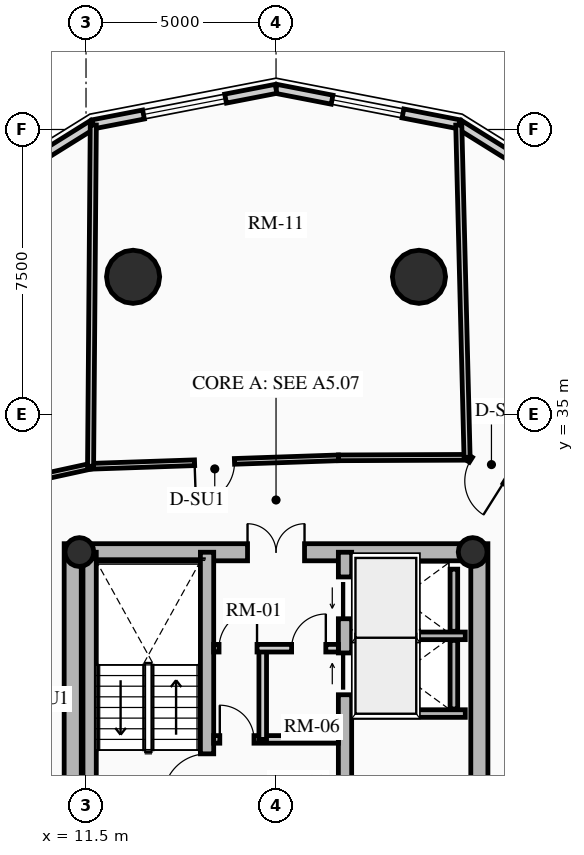
"""IFC4 building model, lengths in metres.
Left out: names, types, materials, properties, quantities, classifications, styles, units other than length and angle.
Written with IfcOpenShell. Run it as: python <this file> out.ifc"""

import sys

from ifc_helpers import new_model, si_unit, direction, frame, frame_2d, origin, origin_2d, place, context, subcontext, project, spatial, rectangle, circle, hollow_circle, extrude, source, transform, mapped, element, fill, save


model = new_model("IFC4")
c1 = context("Model", 3, precision=1e-05, world=origin(), true_north=direction((0.0, 1.0)))
c2 = subcontext(c1, "Body", "Model", "MODEL_VIEW")
j1 = project(units=[si_unit("LENGTHUNIT", "METRE"), si_unit("PLANEANGLEUNIT", "RADIAN")], contexts=[c1])
p1 = place(None, origin())
s1 = spatial("IfcSite", under=j1, at=p1, CompositionType="ELEMENT")
p2 = place(p1, origin())
s2 = spatial("IfcBuilding", under=s1, at=p2, CompositionType="ELEMENT")
p3 = place(p2, frame((0.0, 0.0, 81.79)))
s3 = spatial("IfcBuildingStorey", under=s2, at=p3, CompositionType="ELEMENT", Elevation=81.79)
for number, where, z_axis, x_axis in (
    (1, (11.15, 17.4, 0.0), (0.0, 0.0, 1.0), (0.0, 1.0, 0.0)),
    (2, (21.85, 17.4, 0.0), (0.0, 0.0, 1.0), (0.0, 1.0, 0.0)),
):
    element("IfcWall", number, at=place(p3, frame(where, z_axis=z_axis, x_axis=x_axis)), inside=s3, PredefinedType="SHEAR", context=c2, shape_type="SweptSolid", body=[
        extrude(rectangle(XDim=14.2, YDim=0.45, at=frame_2d((7.1, 0.0))), origin(), (0.0, 0.0, 1.0), 2.91),
    ])
p4 = place(p3, frame((11.15, 31.375, 0.0), z_axis=(0.0, 0.0, 1.0), x_axis=(1.0, 0.0, 0.0)))
e3 = element("IfcWall", 3, at=p4, inside=s3, PredefinedType="SHEAR", context=c2, shape_type="SweptSolid", body=[
    extrude(rectangle(XDim=10.7, YDim=0.45, at=frame_2d((5.35, 0.0))), origin(), (0.0, 0.0, 1.0), 2.91),
])
m1 = source(origin(), c2, "Body", "SweptSolid", [
    extrude(rectangle(XDim=1.5, YDim=2.02, at=frame_2d((0.75, 1.01))), frame((0.0, 0.235, 0.0), z_axis=(0.0, -1.0, 0.0), x_axis=(1.0, 0.0, 0.0)), (0.0, 0.0, 1.0), 0.47),
])
p5 = place(p4, frame((4.6, 0.0, 0.0)))
e4 = element("IfcOpeningElement", 4, at=p5, cuts=e3, PredefinedType="OPENING", context=c2, shape_type="MappedRepresentation", body=[
    mapped(m1, transform((0.0, 0.0, 0.0), x_axis=(1.0, 0.0, 0.0), y_axis=(0.0, 1.0, 0.0), z_axis=(0.0, 0.0, 1.0), scale=1.0)),
])
p6 = place(p3, frame((14.685, 17.625, 0.0), z_axis=(0.0, 0.0, 1.0), x_axis=(0.0, 1.0, 0.0)))
e5 = element("IfcWall", 5, at=p6, inside=s3, PredefinedType="SHEAR", context=c2, shape_type="SweptSolid", body=[
    extrude(rectangle(XDim=13.75, YDim=0.35, at=frame_2d((6.875, 0.0))), origin(), (0.0, 0.0, 1.0), 2.91),
])
m2 = source(origin(), c2, "Body", "SweptSolid", [
    extrude(rectangle(XDim=1.1, YDim=2.015, at=frame_2d((0.55, 1.007))), frame((0.0, 0.185, 0.0), z_axis=(0.0, -1.0, 0.0), x_axis=(1.0, 0.0, 0.0)), (0.0, 0.0, 1.0), 0.37),
])
p7 = place(p6, frame((4.875, 0.0, 0.0)))
e6 = element("IfcOpeningElement", 6, at=p7, cuts=e5, PredefinedType="OPENING", context=c2, shape_type="MappedRepresentation", body=[
    mapped(m2, transform((0.0, 0.0, 0.0), x_axis=(1.0, 0.0, 0.0), y_axis=(0.0, 1.0, 0.0), z_axis=(0.0, 0.0, 1.0), scale=1.0)),
])
m3 = source(origin(), c2, "Body", "SweptSolid", [
    extrude(rectangle(XDim=1.15, YDim=2.02, at=frame_2d((0.575, 1.01))), frame((0.0, 0.185, 0.0), z_axis=(0.0, -1.0, 0.0), x_axis=(1.0, 0.0, 0.0)), (0.0, 0.0, 1.0), 0.37),
])
p8 = place(p6, frame((7.295, 0.0, 0.0)))
e7 = element("IfcOpeningElement", 7, at=p8, cuts=e5, PredefinedType="OPENING", context=c2, shape_type="MappedRepresentation", body=[
    mapped(m3, transform((0.0, 0.0, 0.0), x_axis=(1.0, 0.0, 0.0), y_axis=(0.0, 1.0, 0.0), z_axis=(0.0, 0.0, 1.0), scale=1.0)),
])
p9 = place(p3, frame((18.315, 17.625, 0.0), z_axis=(0.0, 0.0, 1.0), x_axis=(0.0, 1.0, 0.0)))
e8 = element("IfcWall", 8, at=p9, inside=s3, PredefinedType="SHEAR", context=c2, shape_type="SweptSolid", body=[
    extrude(rectangle(XDim=13.75, YDim=0.35, at=frame_2d((6.875, 0.0))), origin(), (0.0, 0.0, 1.0), 2.91),
])
p10 = place(p9, frame((10.0, 0.0, 0.0)))
e9 = element("IfcOpeningElement", 9, at=p10, cuts=e8, PredefinedType="OPENING", context=c2, shape_type="MappedRepresentation", body=[
    mapped(m2, transform((0.0, 0.0, 0.0), x_axis=(1.0, 0.0, 0.0), y_axis=(0.0, 1.0, 0.0), z_axis=(0.0, 0.0, 1.0), scale=1.0)),
])
p11 = place(p9, frame((12.0, 0.0, 0.0)))
e10 = element("IfcOpeningElement", 10, at=p11, cuts=e8, PredefinedType="OPENING", context=c2, shape_type="MappedRepresentation", body=[
    mapped(m2, transform((0.0, 0.0, 0.0), x_axis=(1.0, 0.0, 0.0), y_axis=(0.0, 1.0, 0.0), z_axis=(0.0, 0.0, 1.0), scale=1.0)),
])
p12 = place(p9, frame((5.305, 0.0, 0.0)))
e11 = element("IfcOpeningElement", 11, at=p12, cuts=e8, PredefinedType="OPENING", context=c2, shape_type="MappedRepresentation", body=[
    mapped(m3, transform((0.0, 0.0, 0.0), x_axis=(1.0, 0.0, 0.0), y_axis=(0.0, 1.0, 0.0), z_axis=(0.0, 0.0, 1.0), scale=1.0)),
])
p13 = place(p3, frame((11.595, 24.655, 0.0), z_axis=(0.0, 0.0, 1.0), x_axis=(0.0, 1.0, 0.0)))
e12 = element("IfcWall", 12, at=p13, inside=s3, PredefinedType="SHEAR", context=c2, shape_type="SweptSolid", body=[
    extrude(rectangle(XDim=6.72, YDim=0.35, at=frame_2d((3.36, 0.0))), origin(), (0.0, 0.0, 1.0), 2.91),
])
for number, where, z_axis, x_axis in (
    (13, (11.325, 31.38, 0.0), (0.0, 0.0, 1.0), (1.0, 0.0, 0.0)),
    (14, (21.675, 31.38, 0.0), (0.0, 0.0, 1.0), (1.0, 0.0, 0.0)),
):
    element("IfcColumn", number, at=place(p3, frame(where, z_axis=z_axis, x_axis=x_axis)), inside=s3, PredefinedType="COLUMN", context=c2, shape_type="SweptSolid", body=[
        extrude(hollow_circle(Radius=0.38, WallThickness=0.032, at=origin_2d()), origin(), (0.0, 0.0, 1.0), 2.91),
    ])
for number, where, z_axis, x_axis in (
    (15, (20.261, 38.623, 0.0), (0.0, 0.0, 1.0), (1.0, 0.0, 0.0)),
    (16, (12.739, 38.623, 0.0), (0.0, 0.0, 1.0), (1.0, 0.0, 0.0)),
):
    element("IfcColumn", number, at=place(p3, frame(where, z_axis=z_axis, x_axis=x_axis)), inside=s3, PredefinedType="USERDEFINED", context=c2, shape_type="SweptSolid", body=[
        extrude(circle(Radius=0.7, at=origin_2d()), origin(), (0.0, 0.0, 1.0), 2.91),
    ])
p14 = place(p3, frame((21.315, 42.637, 0.0), z_axis=(0.0, 0.0, 1.0), x_axis=(0.848520380187, -0.529162701263, 0.0)))
e17 = element("IfcWall", 17, at=p14, inside=s3, PredefinedType="SOLIDWALL", context=c2, shape_type="SweptSolid", body=[
    extrude(rectangle(XDim=5.119, YDim=0.24, at=frame_2d((2.56, 0.0))), origin(), (0.0, 0.0, 1.0), 2.179),
])
p15 = place(p3, frame((16.5, 43.57, 0.0), z_axis=(0.0, 0.0, 1.0), x_axis=(0.981723785992, -0.190311344954, 0.0)))
e18 = element("IfcWall", 18, at=p15, inside=s3, PredefinedType="SOLIDWALL", context=c2, shape_type="SweptSolid", body=[
    extrude(rectangle(XDim=4.904, YDim=0.24, at=frame_2d((2.452, 0.0))), origin(), (0.0, 0.0, 1.0), 2.179),
])
m4 = source(origin(), c2, "Body", "SweptSolid", [
    extrude(rectangle(XDim=1.9, YDim=1.35, at=frame_2d((0.95, 0.675))), frame((0.0, 0.13, 0.0), z_axis=(0.0, -1.0, 0.0), x_axis=(1.0, 0.0, 0.0)), (0.0, 0.0, 1.0), 0.26),
])
p16 = place(p15, frame((1.502, 0.0, 0.65)))
e19 = element("IfcOpeningElement", 19, at=p16, cuts=e18, PredefinedType="OPENING", context=c2, shape_type="MappedRepresentation", body=[
    mapped(m4, transform((0.0, 0.0, 0.0), x_axis=(1.0, 0.0, 0.0), y_axis=(0.0, 1.0, 0.0), z_axis=(0.0, 0.0, 1.0), scale=1.0)),
])
p17 = place(p3, frame((11.685, 42.637, 0.0), z_axis=(0.0, 0.0, 1.0), x_axis=(0.981723785992, 0.190311344954, 0.0)))
e20 = element("IfcWall", 20, at=p17, inside=s3, PredefinedType="SOLIDWALL", context=c2, shape_type="SweptSolid", body=[
    extrude(rectangle(XDim=4.904, YDim=0.24, at=frame_2d((2.452, 0.0))), origin(), (0.0, 0.0, 1.0), 2.179),
])
m5 = source(origin(), c2, "Body", "SweptSolid", [
    extrude(rectangle(XDim=2.2, YDim=1.35, at=frame_2d((1.1, 0.675))), frame((0.0, 0.13, 0.0), z_axis=(0.0, -1.0, 0.0), x_axis=(1.0, 0.0, 0.0)), (0.0, 0.0, 1.0), 0.26),
])
p18 = place(p17, frame((1.352, 0.0, 0.65)))
e21 = element("IfcOpeningElement", 21, at=p18, cuts=e20, PredefinedType="OPENING", context=c2, shape_type="MappedRepresentation", body=[
    mapped(m5, transform((0.0, 0.0, 0.0), x_axis=(1.0, 0.0, 0.0), y_axis=(0.0, 1.0, 0.0), z_axis=(0.0, 0.0, 1.0), scale=1.0)),
])
p19 = place(p3, frame((7.342, 39.928, 0.0), z_axis=(0.0, 0.0, 1.0), x_axis=(0.848520380187, 0.529162701263, 0.0)))
e22 = element("IfcWall", 22, at=p19, inside=s3, PredefinedType="SOLIDWALL", context=c2, shape_type="SweptSolid", body=[
    extrude(rectangle(XDim=5.119, YDim=0.24, at=frame_2d((2.56, 0.0))), origin(), (0.0, 0.0, 1.0), 2.179),
])
for number, where, z_axis, x_axis in (
    (23, (18.51, 27.13, 0.0), (0.0, 0.0, 1.0), (1.0, 0.0, 0.0)),
    (24, (18.51, 29.175, 0.0), (0.0, 0.0, 1.0), (1.0, 0.0, 0.0)),
):
    element("IfcWall", number, at=place(p3, frame(where, z_axis=z_axis, x_axis=x_axis)), inside=s3, PredefinedType="SHEAR", context=c2, shape_type="SweptSolid", body=[
        extrude(rectangle(XDim=2.97, YDim=0.2, at=frame_2d((1.485, 0.0))), origin(), (0.0, 0.0, 1.0), 2.91),
    ])
p20 = place(p3, frame((21.18, 27.25, 0.0), z_axis=(0.0, 0.0, 1.0), x_axis=(0.0, 1.0, 0.0)))
e25 = element("IfcWall", 25, at=p20, inside=s3, PredefinedType="SHEAR", context=c2, shape_type="SweptSolid", body=[
    extrude(rectangle(XDim=1.805, YDim=0.2, at=frame_2d((0.902, 0.0))), origin(), (0.0, 0.0, 1.0), 2.91),
])
p21 = place(p3, frame((21.18, 29.295, 0.0), z_axis=(0.0, 0.0, 1.0), x_axis=(0.0, 1.0, 0.0)))
e26 = element("IfcWall", 26, at=p21, inside=s3, PredefinedType="SHEAR", context=c2, shape_type="SweptSolid", body=[
    extrude(rectangle(XDim=1.635, YDim=0.2, at=frame_2d((0.817, 0.0))), origin(), (0.0, 0.0, 1.0), 2.91),
])
p22 = place(p3, frame((14.86, 26.45, 0.0), z_axis=(0.0, 0.0, 1.0), x_axis=(1.0, 0.0, 0.0)))
e27 = element("IfcWall", 27, at=p22, inside=s3, PredefinedType="PARTITIONING", context=c2, shape_type="SweptSolid", body=[
    extrude(rectangle(XDim=3.28, YDim=0.2, at=frame_2d((1.64, 0.0))), origin(), (0.0, 0.0, 1.0), 2.655),
])
m6 = source(origin(), c2, "Body", "SweptSolid", [
    extrude(rectangle(XDim=0.9, YDim=2.005, at=frame_2d((0.45, 1.002))), frame((0.0, 0.11, 0.0), z_axis=(0.0, -1.0, 0.0), x_axis=(1.0, 0.0, 0.0)), (0.0, 0.0, 1.0), 0.22),
])
p23 = place(p22, frame((0.16, 0.0, 0.0)))
e28 = element("IfcOpeningElement", 28, at=p23, cuts=e27, PredefinedType="OPENING", context=c2, shape_type="MappedRepresentation", body=[
    mapped(m6, transform((0.0, 0.0, 0.0), x_axis=(1.0, 0.0, 0.0), y_axis=(0.0, 1.0, 0.0), z_axis=(0.0, 0.0, 1.0), scale=1.0)),
])
p24 = place(p3, frame((16.15, 26.45, 0.0), z_axis=(0.0, 0.0, 1.0), x_axis=(0.0, 1.0, 0.0)))
e29 = element("IfcWall", 29, at=p24, inside=s3, PredefinedType="PARTITIONING", context=c2, shape_type="SweptSolid", body=[
    extrude(rectangle(XDim=2.4, YDim=0.2, at=frame_2d((1.2, 0.0))), origin(), (0.0, 0.0, 1.0), 2.655),
])
p25 = place(p3, frame((14.86, 28.85, 0.0), z_axis=(0.0, 0.0, 1.0), x_axis=(1.0, 0.0, 0.0)))
e30 = element("IfcWall", 30, at=p25, inside=s3, PredefinedType="PARTITIONING", context=c2, shape_type="SweptSolid", body=[
    extrude(rectangle(XDim=3.28, YDim=0.2, at=frame_2d((1.64, 0.0))), origin(), (0.0, 0.0, 1.0), 2.655),
])
m7 = source(origin(), c2, "Body", "SweptSolid", [
    extrude(rectangle(XDim=1.0, YDim=2.015, at=frame_2d((0.5, 1.007))), frame((0.0, 0.11, 0.0), z_axis=(0.0, -1.0, 0.0), x_axis=(1.0, 0.0, 0.0)), (0.0, 0.0, 1.0), 0.22),
])
p26 = place(p25, frame((0.14, 0.0, 0.0)))
e31 = element("IfcOpeningElement", 31, at=p26, cuts=e30, PredefinedType="OPENING", context=c2, shape_type="MappedRepresentation", body=[
    mapped(m7, transform((0.0, 0.0, 0.0), x_axis=(1.0, 0.0, 0.0), y_axis=(0.0, 1.0, 0.0), z_axis=(0.0, 0.0, 1.0), scale=1.0)),
])
p27 = place(p25, frame((2.05, 0.0, 0.0)))
e32 = element("IfcOpeningElement", 32, at=p27, cuts=e30, PredefinedType="OPENING", context=c2, shape_type="MappedRepresentation", body=[
    mapped(m6, transform((0.0, 0.0, 0.0), x_axis=(1.0, 0.0, 0.0), y_axis=(0.0, 1.0, 0.0), z_axis=(0.0, 0.0, 1.0), scale=1.0)),
])
p28 = place(p3, frame((22.877, 33.022, 0.0), z_axis=(0.0, 0.0, 1.0), x_axis=(-0.845895608855, 0.533348496689, 0.0)))
e33 = element("IfcWall", 33, at=p28, inside=s3, PredefinedType="PARTITIONING", context=c2, shape_type="SweptSolid", body=[
    extrude(rectangle(XDim=1.597, YDim=0.15, at=frame_2d((0.798, 0.0))), origin(), (0.0, 0.0, 1.0), 2.225),
])
m8 = source(origin(), c2, "Body", "SweptSolid", [
    extrude(rectangle(XDim=1.05, YDim=2.015, at=frame_2d((0.525, 1.007))), frame((0.0, 0.085, 0.0), z_axis=(0.0, -1.0, 0.0), x_axis=(1.0, 0.0, 0.0)), (0.0, 0.0, 1.0), 0.17),
])
p29 = place(p28, frame((0.427, 0.0, 0.0)))
e34 = element("IfcOpeningElement", 34, at=p29, cuts=e33, PredefinedType="OPENING", context=c2, shape_type="MappedRepresentation", body=[
    mapped(m8, transform((0.0, 0.0, 0.0), x_axis=(1.0, 0.0, 0.0), y_axis=(0.0, 1.0, 0.0), z_axis=(0.0, 0.0, 1.0), scale=1.0)),
])
p30 = place(p3, frame((21.527, 33.873, 0.0), z_axis=(0.0, 0.0, 1.0), x_axis=(-0.999991838845, -0.004040079574, 0.0)))
e35 = element("IfcWall", 35, at=p30, inside=s3, PredefinedType="PARTITIONING", context=c2, shape_type="SweptSolid", body=[
    extrude(rectangle(XDim=3.384, YDim=0.15, at=frame_2d((1.692, 0.0))), origin(), (0.0, 0.0, 1.0), 2.225),
])
p31 = place(p3, frame((18.143, 33.86, 0.0), z_axis=(0.0, 0.0, 1.0), x_axis=(-0.999419208319, -0.034077060363, 0.0)))
e36 = element("IfcWall", 36, at=p31, inside=s3, PredefinedType="PARTITIONING", context=c2, shape_type="SweptSolid", body=[
    extrude(rectangle(XDim=6.527, YDim=0.15, at=frame_2d((3.263, 0.0))), origin(), (0.0, 0.0, 1.0), 2.225),
])
p32 = place(p31, frame((2.738, 0.0, 0.0)))
e37 = element("IfcOpeningElement", 37, at=p32, cuts=e36, PredefinedType="OPENING", context=c2, shape_type="MappedRepresentation", body=[
    mapped(m8, transform((0.0, 0.0, 0.0), x_axis=(1.0, 0.0, 0.0), y_axis=(0.0, 1.0, 0.0), z_axis=(0.0, 0.0, 1.0), scale=1.0)),
])
p33 = place(p3, frame((11.62, 33.637, 0.0), z_axis=(0.0, 0.0, 1.0), x_axis=(-0.97702579435, -0.213121085711, 0.0)))
e38 = element("IfcWall", 38, at=p33, inside=s3, PredefinedType="PARTITIONING", context=c2, shape_type="SweptSolid", body=[
    extrude(rectangle(XDim=1.935, YDim=0.15, at=frame_2d((0.967, 0.0))), origin(), (0.0, 0.0, 1.0), 2.225),
])
p34 = place(p3, frame((21.527, 33.873, 0.0), z_axis=(0.0, 0.0, 1.0), x_axis=(-0.024952442794, 0.999688639327, 0.0)))
e39 = element("IfcWall", 39, at=p34, inside=s3, PredefinedType="PARTITIONING", context=c2, shape_type="SweptSolid", body=[
    extrude(rectangle(XDim=8.747, YDim=0.16, at=frame_2d((4.374, 0.0))), origin(), (0.0, 0.0, 1.0), 2.179),
])
p35 = place(p3, frame((11.62, 33.637, 0.0), z_axis=(0.0, 0.0, 1.0), x_axis=(0.007965167065, 0.999968277554, 0.0)))
e40 = element("IfcWall", 40, at=p35, inside=s3, PredefinedType="PARTITIONING", context=c2, shape_type="SweptSolid", body=[
    extrude(rectangle(XDim=8.981, YDim=0.16, at=frame_2d((4.49, 0.0))), origin(), (0.0, 0.0, 1.0), 2.179),
])
m9 = source(origin(), c2, "Body", "SweptSolid", [
    extrude(rectangle(XDim=1.9, YDim=1.35, at=frame_2d((0.95, 0.675))), frame((0.0, 0.03, 0.0), z_axis=(0.0, -1.0, 0.0), x_axis=(1.0, 0.0, 0.0)), (0.0, 0.0, 1.0), 0.06),
])
p36 = place(p16, origin())
e41 = element("IfcWindow", 41, at=p36, inside=s3, PartitioningType="DOUBLE_PANEL_VERTICAL", PredefinedType="WINDOW", context=c2, shape_type="MappedRepresentation", body=[
    mapped(m9, transform((0.0, 0.0, 0.0), x_axis=(1.0, 0.0, 0.0), y_axis=(0.0, 1.0, 0.0), z_axis=(0.0, 0.0, 1.0), scale=1.0)),
])
fill(e19, e41)
m10 = source(origin(), c2, "Body", "SweptSolid", [
    extrude(rectangle(XDim=2.2, YDim=1.35, at=frame_2d((1.1, 0.675))), frame((0.0, 0.03, 0.0), z_axis=(0.0, -1.0, 0.0), x_axis=(1.0, 0.0, 0.0)), (0.0, 0.0, 1.0), 0.06),
])
p37 = place(p18, origin())
e42 = element("IfcWindow", 42, at=p37, inside=s3, PartitioningType="DOUBLE_PANEL_VERTICAL", PredefinedType="WINDOW", context=c2, shape_type="MappedRepresentation", body=[
    mapped(m10, transform((0.0, 0.0, 0.0), x_axis=(1.0, 0.0, 0.0), y_axis=(0.0, 1.0, 0.0), z_axis=(0.0, 0.0, 1.0), scale=1.0)),
])
fill(e21, e42)
m11 = source(origin(), c2, "Body", "SweptSolid", [
    extrude(rectangle(XDim=1.1, YDim=2.015, at=frame_2d((0.55, 1.007))), frame((0.0, 0.025, 0.0), z_axis=(0.0, -1.0, 0.0), x_axis=(1.0, 0.0, 0.0)), (0.0, 0.0, 1.0), 0.05),
])
p38 = place(p10, origin())
e43 = element("IfcDoor", 43, at=p38, inside=s3, OperationType="SLIDING_TO_RIGHT", PredefinedType="DOOR", context=c2, shape_type="MappedRepresentation", body=[
    mapped(m11, transform((0.0, 0.0, 0.0), x_axis=(1.0, 0.0, 0.0), y_axis=(0.0, 1.0, 0.0), z_axis=(0.0, 0.0, 1.0), scale=1.0)),
])
fill(e9, e43)
p39 = place(p11, origin())
e44 = element("IfcDoor", 44, at=p39, inside=s3, OperationType="SLIDING_TO_LEFT", PredefinedType="DOOR", context=c2, shape_type="MappedRepresentation", body=[
    mapped(m11, transform((0.0, 0.0, 0.0), x_axis=(1.0, 0.0, 0.0), y_axis=(0.0, 1.0, 0.0), z_axis=(0.0, 0.0, 1.0), scale=1.0)),
])
fill(e10, e44)
m12 = source(origin(), c2, "Body", "SweptSolid", [
    extrude(rectangle(XDim=1.15, YDim=2.02, at=frame_2d((0.575, 1.01))), frame((0.0, 0.025, 0.0), z_axis=(0.0, -1.0, 0.0), x_axis=(1.0, 0.0, 0.0)), (0.0, 0.0, 1.0), 0.05),
])
p40 = place(p8, origin())
e45 = element("IfcDoor", 45, at=p40, inside=s3, OperationType="SINGLE_SWING_LEFT", PredefinedType="DOOR", context=c2, shape_type="MappedRepresentation", body=[
    mapped(m12, transform((0.0, 0.0, 0.0), x_axis=(1.0, 0.0, 0.0), y_axis=(0.0, 1.0, 0.0), z_axis=(0.0, 0.0, 1.0), scale=1.0)),
])
fill(e7, e45)
m13 = source(origin(), c2, "Body", "SweptSolid", [
    extrude(rectangle(XDim=1.5, YDim=2.02, at=frame_2d((0.75, 1.01))), frame((0.0, 0.025, 0.0), z_axis=(0.0, -1.0, 0.0), x_axis=(1.0, 0.0, 0.0)), (0.0, 0.0, 1.0), 0.05),
])
p41 = place(p5, origin())
e46 = element("IfcDoor", 46, at=p41, inside=s3, OperationType="DOUBLE_DOOR_SINGLE_SWING", PredefinedType="DOOR", context=c2, shape_type="MappedRepresentation", body=[
    mapped(m13, transform((0.0, 0.0, 0.0), x_axis=(1.0, 0.0, 0.0), y_axis=(0.0, 1.0, 0.0), z_axis=(0.0, 0.0, 1.0), scale=1.0)),
])
fill(e4, e46)
m14 = source(origin(), c2, "Body", "SweptSolid", [
    extrude(rectangle(XDim=0.9, YDim=2.005, at=frame_2d((0.45, 1.002))), frame((0.0, 0.025, 0.0), z_axis=(0.0, -1.0, 0.0), x_axis=(1.0, 0.0, 0.0)), (0.0, 0.0, 1.0), 0.05),
])
p42 = place(p23, origin())
e47 = element("IfcDoor", 47, at=p42, inside=s3, OperationType="SINGLE_SWING_LEFT", PredefinedType="DOOR", context=c2, shape_type="MappedRepresentation", body=[
    mapped(m14, transform((0.0, 0.0, 0.0), x_axis=(1.0, 0.0, 0.0), y_axis=(0.0, 1.0, 0.0), z_axis=(0.0, 0.0, 1.0), scale=1.0)),
])
fill(e28, e47)
m15 = source(origin(), c2, "Body", "SweptSolid", [
    extrude(rectangle(XDim=1.0, YDim=2.015, at=frame_2d((0.5, 1.007))), frame((0.0, 0.025, 0.0), z_axis=(0.0, -1.0, 0.0), x_axis=(1.0, 0.0, 0.0)), (0.0, 0.0, 1.0), 0.05),
])
p43 = place(p26, origin())
e48 = element("IfcDoor", 48, at=p43, inside=s3, OperationType="SINGLE_SWING_RIGHT", PredefinedType="DOOR", context=c2, shape_type="MappedRepresentation", body=[
    mapped(m15, transform((0.0, 0.0, 0.0), x_axis=(1.0, 0.0, 0.0), y_axis=(0.0, 1.0, 0.0), z_axis=(0.0, 0.0, 1.0), scale=1.0)),
])
fill(e31, e48)
p44 = place(p27, origin())
e49 = element("IfcDoor", 49, at=p44, inside=s3, OperationType="SINGLE_SWING_RIGHT", PredefinedType="DOOR", context=c2, shape_type="MappedRepresentation", body=[
    mapped(m14, transform((0.0, 0.0, 0.0), x_axis=(1.0, 0.0, 0.0), y_axis=(0.0, 1.0, 0.0), z_axis=(0.0, 0.0, 1.0), scale=1.0)),
])
fill(e32, e49)
m16 = source(origin(), c2, "Body", "SweptSolid", [
    extrude(rectangle(XDim=1.05, YDim=2.015, at=frame_2d((0.525, 1.007))), frame((0.0, 0.025, 0.0), z_axis=(0.0, -1.0, 0.0), x_axis=(1.0, 0.0, 0.0)), (0.0, 0.0, 1.0), 0.05),
])
p45 = place(p29, origin())
e50 = element("IfcDoor", 50, at=p45, inside=s3, OperationType="SINGLE_SWING_LEFT", PredefinedType="DOOR", context=c2, shape_type="MappedRepresentation", body=[
    mapped(m16, transform((0.0, 0.0, 0.0), x_axis=(1.0, 0.0, 0.0), y_axis=(0.0, 1.0, 0.0), z_axis=(0.0, 0.0, 1.0), scale=1.0)),
])
fill(e34, e50)
p46 = place(p32, origin())
e51 = element("IfcDoor", 51, at=p46, inside=s3, OperationType="SINGLE_SWING_RIGHT", PredefinedType="DOOR", context=c2, shape_type="MappedRepresentation", body=[
    mapped(m16, transform((0.0, 0.0, 0.0), x_axis=(1.0, 0.0, 0.0), y_axis=(0.0, 1.0, 0.0), z_axis=(0.0, 0.0, 1.0), scale=1.0)),
])
fill(e37, e51)
save(model, sys.argv[1])
